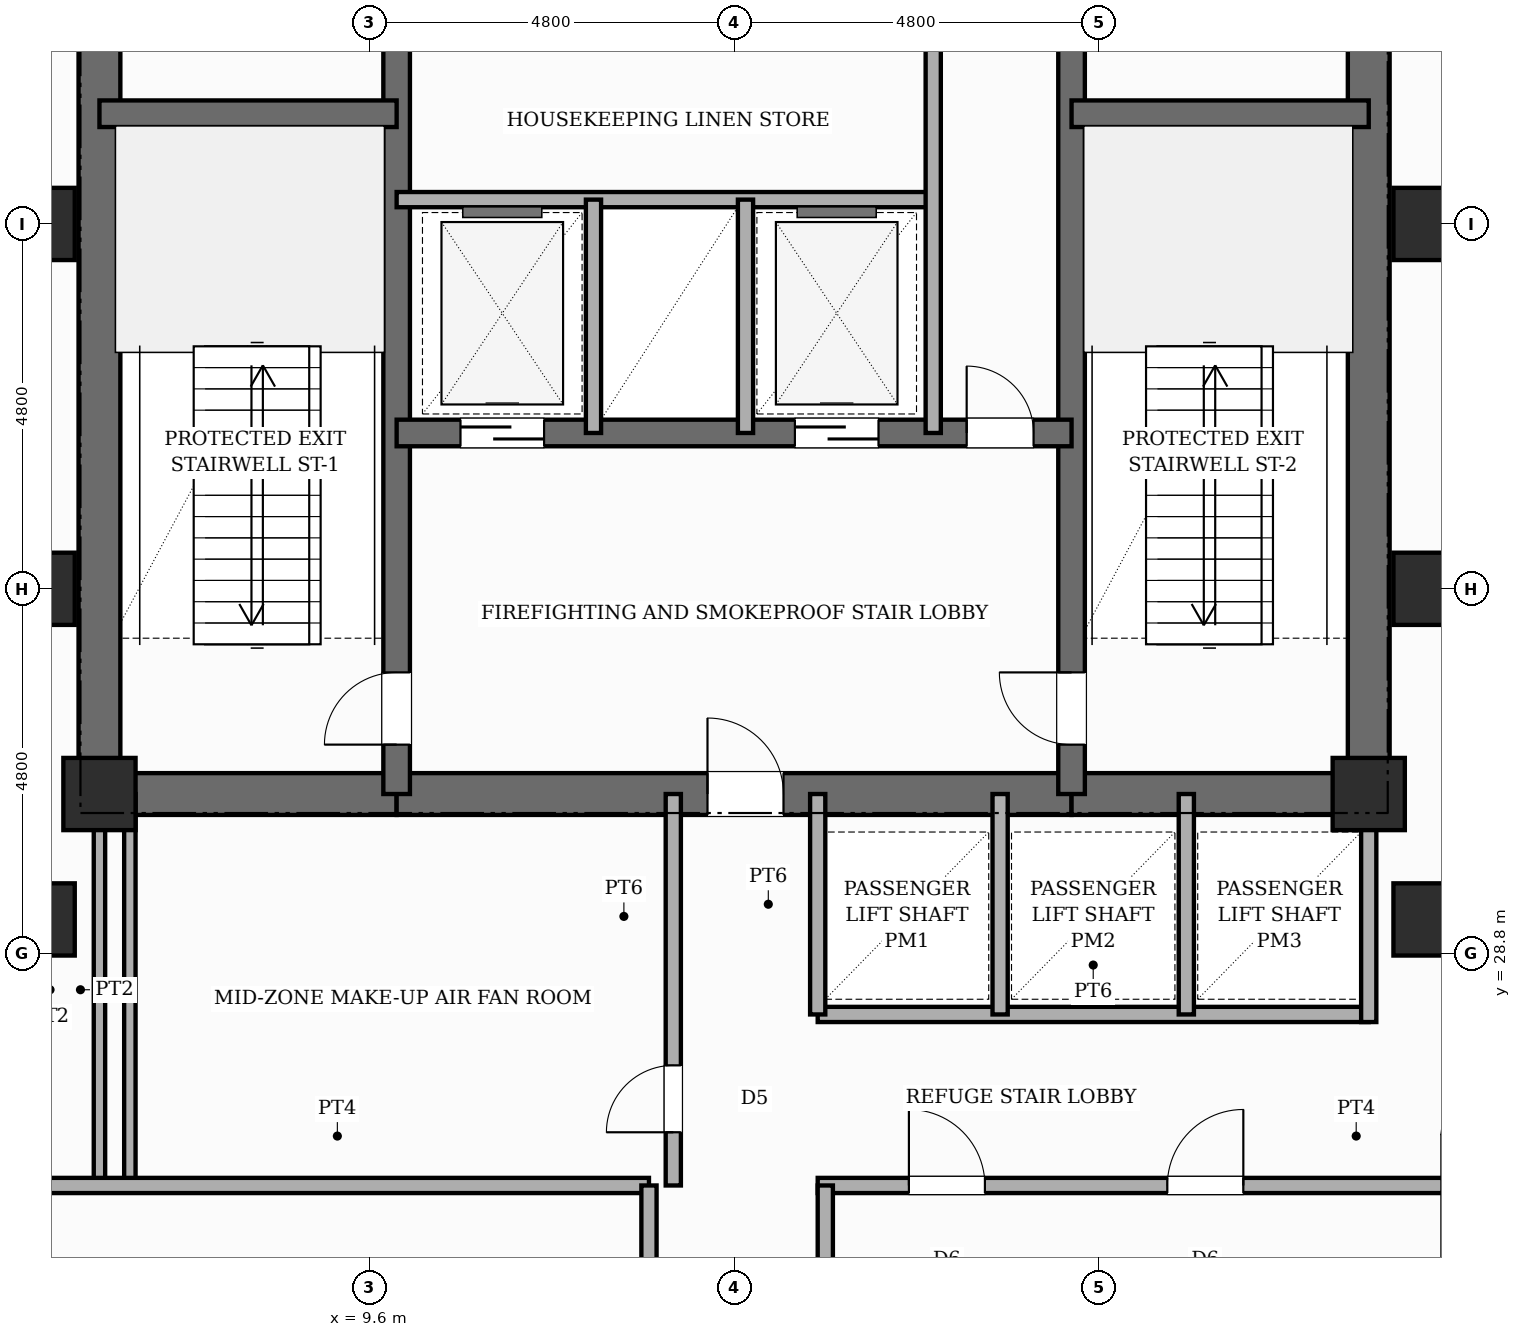
"""IFC4 building model, lengths in metres.
Left out: names, types, materials, properties, quantities, classifications, styles, units other than length and angle.
Written with IfcOpenShell. Run it as: python <this file> out.ifc"""

import sys

from ifc_helpers import new_model, si_unit, direction, frame, frame_2d, origin, origin_2d, place, context, subcontext, project, spatial, rectangle, extrude, element, fill, save


model = new_model("IFC4")
c1 = context("Model", 3, precision=1e-05, world=origin(), true_north=direction((0.0, 1.0)))
c2 = subcontext(c1, "Body", "Model", "MODEL_VIEW")
j1 = project(units=[si_unit("LENGTHUNIT", "METRE"), si_unit("PLANEANGLEUNIT", "RADIAN")], contexts=[c1])
p1 = place(None, origin())
s1 = spatial("IfcSite", under=j1, at=p1, CompositionType="ELEMENT")
p2 = place(p1, origin())
s2 = spatial("IfcBuilding", under=s1, at=p2, CompositionType="ELEMENT")
p3 = place(p2, frame((0.0, 0.0, 198.4)))
s3 = spatial("IfcBuildingStorey", under=s2, at=p3, CompositionType="ELEMENT", Elevation=198.4)
p4 = place(p3, frame((6.05, 30.625, 0.0), z_axis=(0.0, 0.0, 1.0), x_axis=(0.0, 1.0, 0.0)))
e1 = element("IfcWall", 1, at=p4, inside=s3, PredefinedType="SHEAR", context=c2, shape_type="SweptSolid", body=[
    extrude(rectangle(XDim=15.45, YDim=0.55, at=frame_2d((7.725, 0.0))), origin(), (0.0, 0.0, 1.0), 5.4),
])
p5 = place(p3, frame((22.75, 30.625, 0.0), z_axis=(0.0, 0.0, 1.0), x_axis=(0.0, 1.0, 0.0)))
e2 = element("IfcWall", 2, at=p5, inside=s3, PredefinedType="SHEAR", context=c2, shape_type="SweptSolid", body=[
    extrude(rectangle(XDim=15.45, YDim=0.55, at=frame_2d((7.725, 0.0))), origin(), (0.0, 0.0, 1.0), 5.4),
])
p6 = place(p5, frame((10.725, 0.0, 0.0)))
e3 = element("IfcOpeningElement", 3, at=p6, cuts=e2, PredefinedType="OPENING", context=c2, shape_type="SweptSolid", body=[
    extrude(rectangle(XDim=1.0, YDim=2.15, at=frame_2d((0.5, 1.075))), frame((0.0, 0.285, 0.0), z_axis=(0.0, -1.0, 0.0), x_axis=(1.0, 0.0, 0.0)), (0.0, 0.0, 1.0), 0.57),
])
p7 = place(p3, frame((6.05, 30.9, 0.0), z_axis=(0.0, 0.0, 1.0), x_axis=(1.0, 0.0, 0.0)))
e4 = element("IfcWall", 4, at=p7, inside=s3, PredefinedType="SHEAR", context=c2, shape_type="SweptSolid", body=[
    extrude(rectangle(XDim=3.91, YDim=0.55, at=frame_2d((1.955, 0.0))), origin(), (0.0, 0.0, 1.0), 5.4),
])
p8 = place(p3, frame((9.96, 30.9, 0.0), z_axis=(0.0, 0.0, 1.0), x_axis=(1.0, 0.0, 0.0)))
e5 = element("IfcWall", 5, at=p8, inside=s3, PredefinedType="SHEAR", context=c2, shape_type="SweptSolid", body=[
    extrude(rectangle(XDim=8.88, YDim=0.55, at=frame_2d((4.44, 0.0))), origin(), (0.0, 0.0, 1.0), 5.4),
])
p9 = place(p8, frame((4.09, 0.0, 0.0)))
e6 = element("IfcOpeningElement", 6, at=p9, cuts=e5, PredefinedType="OPENING", context=c2, shape_type="SweptSolid", body=[
    extrude(rectangle(XDim=1.0, YDim=2.15, at=frame_2d((0.5, 1.075))), frame((0.0, 0.285, 0.0), z_axis=(0.0, -1.0, 0.0), x_axis=(1.0, 0.0, 0.0)), (0.0, 0.0, 1.0), 0.57),
])
p10 = place(p3, frame((18.84, 30.9, 0.0), z_axis=(0.0, 0.0, 1.0), x_axis=(1.0, 0.0, 0.0)))
e7 = element("IfcWall", 7, at=p10, inside=s3, PredefinedType="SHEAR", context=c2, shape_type="SweptSolid", body=[
    extrude(rectangle(XDim=3.91, YDim=0.55, at=frame_2d((1.955, 0.0))), origin(), (0.0, 0.0, 1.0), 5.4),
])
p11 = place(p3, frame((9.96, 30.9, 0.0), z_axis=(0.0, 0.0, 1.0), x_axis=(0.0, 1.0, 0.0)))
e8 = element("IfcWall", 8, at=p11, inside=s3, PredefinedType="SHEAR", context=c2, shape_type="SweptSolid", body=[
    extrude(rectangle(XDim=14.9, YDim=0.35, at=frame_2d((7.45, 0.0))), origin(), (0.0, 0.0, 1.0), 5.4),
])
p12 = place(p11, frame((0.65, 0.0, 0.0)))
e9 = element("IfcOpeningElement", 9, at=p12, cuts=e8, PredefinedType="OPENING", context=c2, shape_type="SweptSolid", body=[
    extrude(rectangle(XDim=0.95, YDim=2.1, at=frame_2d((0.475, 1.05))), frame((0.0, 0.185, 0.0), z_axis=(0.0, -1.0, 0.0), x_axis=(1.0, 0.0, 0.0)), (0.0, 0.0, 1.0), 0.37),
])
p13 = place(p11, frame((10.45, 0.0, 0.0)))
e10 = element("IfcOpeningElement", 10, at=p13, cuts=e8, PredefinedType="OPENING", context=c2, shape_type="SweptSolid", body=[
    extrude(rectangle(XDim=1.0, YDim=2.15, at=frame_2d((0.5, 1.075))), frame((0.0, 0.185, 0.0), z_axis=(0.0, -1.0, 0.0), x_axis=(1.0, 0.0, 0.0)), (0.0, 0.0, 1.0), 0.37),
])
p14 = place(p3, frame((18.84, 30.9, 0.0), z_axis=(0.0, 0.0, 1.0), x_axis=(0.0, 1.0, 0.0)))
e11 = element("IfcWall", 11, at=p14, inside=s3, PredefinedType="SHEAR", context=c2, shape_type="SweptSolid", body=[
    extrude(rectangle(XDim=14.9, YDim=0.35, at=frame_2d((7.45, 0.0))), origin(), (0.0, 0.0, 1.0), 5.4),
])
p15 = place(p14, frame((0.65, 0.0, 0.0)))
e12 = element("IfcOpeningElement", 12, at=p15, cuts=e11, PredefinedType="OPENING", context=c2, shape_type="SweptSolid", body=[
    extrude(rectangle(XDim=0.95, YDim=2.1, at=frame_2d((0.475, 1.05))), frame((0.0, 0.185, 0.0), z_axis=(0.0, -1.0, 0.0), x_axis=(1.0, 0.0, 0.0)), (0.0, 0.0, 1.0), 0.37),
])
p16 = place(p14, frame((10.45, 0.0, 0.0)))
e13 = element("IfcOpeningElement", 13, at=p16, cuts=e11, PredefinedType="OPENING", context=c2, shape_type="SweptSolid", body=[
    extrude(rectangle(XDim=1.0, YDim=2.15, at=frame_2d((0.5, 1.075))), frame((0.0, 0.185, 0.0), z_axis=(0.0, -1.0, 0.0), x_axis=(1.0, 0.0, 0.0)), (0.0, 0.0, 1.0), 0.37),
])
for number, where, z_axis, x_axis in (
    (14, (6.05, 39.85, 0.0), (0.0, 0.0, 1.0), (1.0, 0.0, 0.0)),
    (15, (18.84, 39.85, 0.0), (0.0, 0.0, 1.0), (1.0, 0.0, 0.0)),
):
    element("IfcWall", number, at=place(p3, frame(where, z_axis=z_axis, x_axis=x_axis)), inside=s3, PredefinedType="SHEAR", context=c2, shape_type="SweptSolid", body=[
        extrude(rectangle(XDim=3.91, YDim=0.35, at=frame_2d((1.955, 0.0))), origin(), (0.0, 0.0, 1.0), 5.4),
    ])
p17 = place(p3, frame((9.96, 35.65, 0.0), z_axis=(0.0, 0.0, 1.0), x_axis=(1.0, 0.0, 0.0)))
e16 = element("IfcWall", 16, at=p17, inside=s3, PredefinedType="SHEAR", context=c2, shape_type="SweptSolid", body=[
    extrude(rectangle(XDim=8.88, YDim=0.35, at=frame_2d((4.44, 0.0))), origin(), (0.0, 0.0, 1.0), 5.4),
])
p18 = place(p17, frame((0.84, 0.0, 0.0)))
e17 = element("IfcOpeningElement", 17, at=p18, cuts=e16, PredefinedType="OPENING", context=c2, shape_type="SweptSolid", body=[
    extrude(rectangle(XDim=1.1, YDim=2.15, at=frame_2d((0.55, 1.075))), frame((0.0, 0.185, 0.0), z_axis=(0.0, -1.0, 0.0), x_axis=(1.0, 0.0, 0.0)), (0.0, 0.0, 1.0), 0.37),
])
p19 = place(p17, frame((5.24, 0.0, 0.0)))
e18 = element("IfcOpeningElement", 18, at=p19, cuts=e16, PredefinedType="OPENING", context=c2, shape_type="SweptSolid", body=[
    extrude(rectangle(XDim=1.1, YDim=2.15, at=frame_2d((0.55, 1.075))), frame((0.0, 0.185, 0.0), z_axis=(0.0, -1.0, 0.0), x_axis=(1.0, 0.0, 0.0)), (0.0, 0.0, 1.0), 0.37),
])
p20 = place(p17, frame((7.5, 0.0, 0.0)))
e19 = element("IfcOpeningElement", 19, at=p20, cuts=e16, PredefinedType="OPENING", context=c2, shape_type="SweptSolid", body=[
    extrude(rectangle(XDim=0.88, YDim=2.1, at=frame_2d((0.44, 1.05))), frame((0.0, 0.185, 0.0), z_axis=(0.0, -1.0, 0.0), x_axis=(1.0, 0.0, 0.0)), (0.0, 0.0, 1.0), 0.37),
])
for number, where, z_axis, x_axis in (
    (20, (5.25, 29.25, 0.0), (0.0, 0.0, 1.0), (1.0, 0.0, 0.0)),
    (21, (5.25, 33.6, 0.0), (0.0, 0.0, 1.0), (1.0, 0.0, 0.0)),
    (22, (5.25, 38.4, 0.0), (0.0, 0.0, 1.0), (1.0, 0.0, 0.0)),
    (23, (6.05, 30.9, 0.0), (0.0, 0.0, 1.0), (1.0, 0.0, 0.0)),
    (24, (22.75, 30.9, 0.0), (0.0, 0.0, 1.0), (1.0, 0.0, 0.0)),
    (25, (23.55, 29.25, 0.0), (0.0, 0.0, 1.0), (1.0, 0.0, 0.0)),
    (26, (23.55, 33.6, 0.0), (0.0, 0.0, 1.0), (1.0, 0.0, 0.0)),
    (27, (23.55, 38.4, 0.0), (0.0, 0.0, 1.0), (1.0, 0.0, 0.0)),
):
    element("IfcColumn", number, at=place(p3, frame(where, z_axis=z_axis, x_axis=x_axis)), inside=s3, PredefinedType="COLUMN", context=c2, shape_type="SweptSolid", body=[
        extrude(rectangle(XDim=0.95, YDim=0.95, at=origin_2d()), origin(), (0.0, 0.0, 1.0), 5.4),
    ])
p21 = place(p3, frame((9.96, 38.72, 0.0), z_axis=(0.0, 0.0, 1.0), x_axis=(1.0, 0.0, 0.0)))
e28 = element("IfcWall", 28, at=p21, inside=s3, PredefinedType="POLYGONAL", context=c2, shape_type="SweptSolid", body=[
    extrude(rectangle(XDim=7.06, YDim=0.2, at=frame_2d((3.53, 0.0))), origin(), (0.0, 0.0, 1.0), 5.18),
])
for number, where, z_axis, x_axis in (
    (29, (12.55, 35.65, 0.0), (0.0, 0.0, 1.0), (0.0, 1.0, 0.0)),
    (30, (14.55, 35.65, 0.0), (0.0, 0.0, 1.0), (0.0, 1.0, 0.0)),
):
    element("IfcWall", number, at=place(p3, frame(where, z_axis=z_axis, x_axis=x_axis)), inside=s3, PredefinedType="POLYGONAL", context=c2, shape_type="SweptSolid", body=[
        extrude(rectangle(XDim=3.07, YDim=0.2, at=frame_2d((1.535, 0.0))), origin(), (0.0, 0.0, 1.0), 5.18),
    ])
p22 = place(p3, frame((17.02, 35.65, 0.0), z_axis=(0.0, 0.0, 1.0), x_axis=(0.0, 1.0, 0.0)))
e31 = element("IfcWall", 31, at=p22, inside=s3, PredefinedType="POLYGONAL", context=c2, shape_type="SweptSolid", body=[
    extrude(rectangle(XDim=5.15, YDim=0.2, at=frame_2d((2.575, 0.0))), origin(), (0.0, 0.0, 1.0), 5.18),
])
p23 = place(p3, frame((13.6, 25.75, 0.0), z_axis=(0.0, 0.0, 1.0), x_axis=(0.0, 1.0, 0.0)))
e32 = element("IfcWall", 32, at=p23, inside=s3, PredefinedType="POLYGONAL", context=c2, shape_type="SweptSolid", body=[
    extrude(rectangle(XDim=5.15, YDim=0.2, at=frame_2d((2.575, 0.0))), origin(), (0.0, 0.0, 1.0), 5.18),
])
p24 = place(p23, frame((0.7, 0.0, 0.0)))
e33 = element("IfcOpeningElement", 33, at=p24, cuts=e32, PredefinedType="OPENING", context=c2, shape_type="SweptSolid", body=[
    extrude(rectangle(XDim=0.88, YDim=2.1, at=frame_2d((0.44, 1.05))), frame((0.0, 0.11, 0.0), z_axis=(0.0, -1.0, 0.0), x_axis=(1.0, 0.0, 0.0)), (0.0, 0.0, 1.0), 0.22),
])
for number, where, z_axis, x_axis in (
    (34, (6.05, 25.75, 0.0), (0.0, 0.0, 1.0), (0.0, 1.0, 0.0)),
    (35, (6.45, 25.75, 0.0), (0.0, 0.0, 1.0), (0.0, 1.0, 0.0)),
):
    element("IfcWall", number, at=place(p3, frame(where, z_axis=z_axis, x_axis=x_axis)), inside=s3, PredefinedType="PARTITIONING", context=c2, shape_type="SweptSolid", body=[
        extrude(rectangle(XDim=5.15, YDim=0.15, at=frame_2d((2.575, 0.0))), origin(), (0.0, 0.0, 1.0), 5.18),
    ])
p25 = place(p3, frame((15.5, 28.0, 0.0), z_axis=(0.0, 0.0, 1.0), x_axis=(1.0, 0.0, 0.0)))
e36 = element("IfcWall", 36, at=p25, inside=s3, PredefinedType="POLYGONAL", context=c2, shape_type="SweptSolid", body=[
    extrude(rectangle(XDim=7.25, YDim=0.2, at=frame_2d((3.625, 0.0))), origin(), (0.0, 0.0, 1.0), 5.18),
])
p26 = place(p3, frame((15.5, 28.0, 0.0), z_axis=(0.0, 0.0, 1.0), x_axis=(0.0, 1.0, 0.0)))
e37 = element("IfcWall", 37, at=p26, inside=s3, PredefinedType="POLYGONAL", context=c2, shape_type="SweptSolid", body=[
    extrude(rectangle(XDim=2.9, YDim=0.2, at=frame_2d((1.45, 0.0))), origin(), (0.0, 0.0, 1.0), 5.18),
])
p27 = place(p3, frame((22.75, 27.9, 0.0), z_axis=(0.0, 0.0, 1.0), x_axis=(0.0, 1.0, 0.0)))
e38 = element("IfcWall", 38, at=p27, inside=s3, PredefinedType="POLYGONAL", context=c2, shape_type="SweptSolid", body=[
    extrude(rectangle(XDim=3.0, YDim=0.2, at=frame_2d((1.5, 0.0))), origin(), (0.0, 0.0, 1.0), 5.18),
])
for number, where, z_axis, x_axis in (
    (39, (17.9, 28.0, 0.0), (0.0, 0.0, 1.0), (0.0, 1.0, 0.0)),
    (40, (20.35, 28.0, 0.0), (0.0, 0.0, 1.0), (0.0, 1.0, 0.0)),
):
    element("IfcWall", number, at=place(p3, frame(where, z_axis=z_axis, x_axis=x_axis)), inside=s3, PredefinedType="POLYGONAL", context=c2, shape_type="SweptSolid", body=[
        extrude(rectangle(XDim=2.9, YDim=0.2, at=frame_2d((1.45, 0.0))), origin(), (0.0, 0.0, 1.0), 5.18),
    ])
p28 = place(p3, frame((15.5, 25.75, 0.0), z_axis=(0.0, 0.0, 1.0), x_axis=(1.0, 0.0, 0.0)))
e41 = element("IfcWall", 41, at=p28, inside=s3, PredefinedType="PARTITIONING", context=c2, shape_type="SweptSolid", body=[
    extrude(rectangle(XDim=8.22, YDim=0.2, at=frame_2d((4.11, 0.0))), origin(), (0.0, 0.0, 1.0), 5.18),
])
p29 = place(p28, frame((1.2, 0.0, 0.0)))
e42 = element("IfcOpeningElement", 42, at=p29, cuts=e41, PredefinedType="OPENING", context=c2, shape_type="SweptSolid", body=[
    extrude(rectangle(XDim=1.0, YDim=2.15, at=frame_2d((0.5, 1.075))), frame((0.0, 0.11, 0.0), z_axis=(0.0, -1.0, 0.0), x_axis=(1.0, 0.0, 0.0)), (0.0, 0.0, 1.0), 0.22),
])
p30 = place(p28, frame((4.6, 0.0, 0.0)))
e43 = element("IfcOpeningElement", 43, at=p30, cuts=e41, PredefinedType="OPENING", context=c2, shape_type="SweptSolid", body=[
    extrude(rectangle(XDim=1.0, YDim=2.15, at=frame_2d((0.5, 1.075))), frame((0.0, 0.11, 0.0), z_axis=(0.0, -1.0, 0.0), x_axis=(1.0, 0.0, 0.0)), (0.0, 0.0, 1.0), 0.22),
])
p31 = place(p3, frame((5.08, 25.75, 0.0), z_axis=(0.0, 0.0, 1.0), x_axis=(1.0, 0.0, 0.0)))
e44 = element("IfcWall", 44, at=p31, inside=s3, PredefinedType="PARTITIONING", context=c2, shape_type="SweptSolid", body=[
    extrude(rectangle(XDim=8.2, YDim=0.2, at=frame_2d((4.1, 0.0))), origin(), (0.0, 0.0, 1.0), 5.18),
])
p32 = place(p3, frame((13.28, 15.68, 0.0), z_axis=(0.0, 0.0, 1.0), x_axis=(0.0, 1.0, 0.0)))
e45 = element("IfcWall", 45, at=p32, inside=s3, PredefinedType="PARTITIONING", context=c2, shape_type="SweptSolid", body=[
    extrude(rectangle(XDim=10.07, YDim=0.2, at=frame_2d((5.035, 0.0))), origin(), (0.0, 0.0, 1.0), 5.18),
])
p33 = place(p32, frame((1.4, 0.0, 0.0)))
e46 = element("IfcOpeningElement", 46, at=p33, cuts=e45, PredefinedType="OPENING", context=c2, shape_type="SweptSolid", body=[
    extrude(rectangle(XDim=1.0, YDim=2.15, at=frame_2d((0.5, 1.075))), frame((0.0, 0.11, 0.0), z_axis=(0.0, -1.0, 0.0), x_axis=(1.0, 0.0, 0.0)), (0.0, 0.0, 1.0), 0.22),
])
p34 = place(p32, frame((5.8, 0.0, 0.0)))
e47 = element("IfcOpeningElement", 47, at=p34, cuts=e45, PredefinedType="OPENING", context=c2, shape_type="SweptSolid", body=[
    extrude(rectangle(XDim=1.0, YDim=2.15, at=frame_2d((0.5, 1.075))), frame((0.0, 0.11, 0.0), z_axis=(0.0, -1.0, 0.0), x_axis=(1.0, 0.0, 0.0)), (0.0, 0.0, 1.0), 0.22),
])
p35 = place(p3, frame((15.6, 14.98, 0.0), z_axis=(0.0, 0.0, 1.0), x_axis=(0.0, 1.0, 0.0)))
e48 = element("IfcWall", 48, at=p35, inside=s3, PredefinedType="PARTITIONING", context=c2, shape_type="SweptSolid", body=[
    extrude(rectangle(XDim=10.77, YDim=0.2, at=frame_2d((5.385, 0.0))), origin(), (0.0, 0.0, 1.0), 5.18),
])
p36 = place(p12, origin())
e49 = element("IfcDoor", 49, at=p36, inside=s3, OperationType="SINGLE_SWING_LEFT", PredefinedType="DOOR", context=c2, shape_type="SweptSolid", body=[
    extrude(rectangle(XDim=0.95, YDim=2.1, at=frame_2d((0.475, 1.05))), frame((0.0, 0.025, 0.0), z_axis=(0.0, -1.0, 0.0), x_axis=(1.0, 0.0, 0.0)), (0.0, 0.0, 1.0), 0.05),
])
fill(e9, e49)
p37 = place(p15, origin())
e50 = element("IfcDoor", 50, at=p37, inside=s3, OperationType="SINGLE_SWING_RIGHT", PredefinedType="DOOR", context=c2, shape_type="SweptSolid", body=[
    extrude(rectangle(XDim=0.95, YDim=2.1, at=frame_2d((0.475, 1.05))), frame((0.0, 0.025, 0.0), z_axis=(0.0, -1.0, 0.0), x_axis=(1.0, 0.0, 0.0)), (0.0, 0.0, 1.0), 0.05),
])
fill(e12, e50)
p38 = place(p9, origin())
e51 = element("IfcDoor", 51, at=p38, inside=s3, OperationType="SINGLE_SWING_LEFT", PredefinedType="DOOR", context=c2, shape_type="SweptSolid", body=[
    extrude(rectangle(XDim=1.0, YDim=2.15, at=frame_2d((0.5, 1.075))), frame((0.0, 0.025, 0.0), z_axis=(0.0, -1.0, 0.0), x_axis=(1.0, 0.0, 0.0)), (0.0, 0.0, 1.0), 0.05),
])
fill(e6, e51)
p39 = place(p18, origin())
e52 = element("IfcDoor", 52, at=p39, inside=s3, OperationType="SLIDING_TO_LEFT", PredefinedType="DOOR", context=c2, shape_type="SweptSolid", body=[
    extrude(rectangle(XDim=1.1, YDim=2.15, at=frame_2d((0.55, 1.075))), frame((0.0, 0.025, 0.0), z_axis=(0.0, -1.0, 0.0), x_axis=(1.0, 0.0, 0.0)), (0.0, 0.0, 1.0), 0.05),
])
fill(e17, e52)
p40 = place(p19, origin())
e53 = element("IfcDoor", 53, at=p40, inside=s3, OperationType="SLIDING_TO_RIGHT", PredefinedType="DOOR", context=c2, shape_type="SweptSolid", body=[
    extrude(rectangle(XDim=1.1, YDim=2.15, at=frame_2d((0.55, 1.075))), frame((0.0, 0.025, 0.0), z_axis=(0.0, -1.0, 0.0), x_axis=(1.0, 0.0, 0.0)), (0.0, 0.0, 1.0), 0.05),
])
fill(e18, e53)
p41 = place(p20, origin())
e54 = element("IfcDoor", 54, at=p41, inside=s3, OperationType="SINGLE_SWING_LEFT", PredefinedType="DOOR", context=c2, shape_type="SweptSolid", body=[
    extrude(rectangle(XDim=0.88, YDim=2.1, at=frame_2d((0.44, 1.05))), frame((0.0, 0.025, 0.0), z_axis=(0.0, -1.0, 0.0), x_axis=(1.0, 0.0, 0.0)), (0.0, 0.0, 1.0), 0.05),
])
fill(e19, e54)
p42 = place(p24, origin())
e55 = element("IfcDoor", 55, at=p42, inside=s3, OperationType="SINGLE_SWING_LEFT", PredefinedType="DOOR", context=c2, shape_type="SweptSolid", body=[
    extrude(rectangle(XDim=0.88, YDim=2.1, at=frame_2d((0.44, 1.05))), frame((0.0, 0.025, 0.0), z_axis=(0.0, -1.0, 0.0), x_axis=(1.0, 0.0, 0.0)), (0.0, 0.0, 1.0), 0.05),
])
fill(e33, e55)
p43 = place(p29, origin())
e56 = element("IfcDoor", 56, at=p43, inside=s3, OperationType="SINGLE_SWING_LEFT", PredefinedType="DOOR", context=c2, shape_type="SweptSolid", body=[
    extrude(rectangle(XDim=1.0, YDim=2.15, at=frame_2d((0.5, 1.075))), frame((0.0, 0.025, 0.0), z_axis=(0.0, -1.0, 0.0), x_axis=(1.0, 0.0, 0.0)), (0.0, 0.0, 1.0), 0.05),
])
fill(e42, e56)
p44 = place(p30, origin())
e57 = element("IfcDoor", 57, at=p44, inside=s3, OperationType="SINGLE_SWING_RIGHT", PredefinedType="DOOR", context=c2, shape_type="SweptSolid", body=[
    extrude(rectangle(XDim=1.0, YDim=2.15, at=frame_2d((0.5, 1.075))), frame((0.0, 0.025, 0.0), z_axis=(0.0, -1.0, 0.0), x_axis=(1.0, 0.0, 0.0)), (0.0, 0.0, 1.0), 0.05),
])
fill(e43, e57)
save(model, sys.argv[1])
